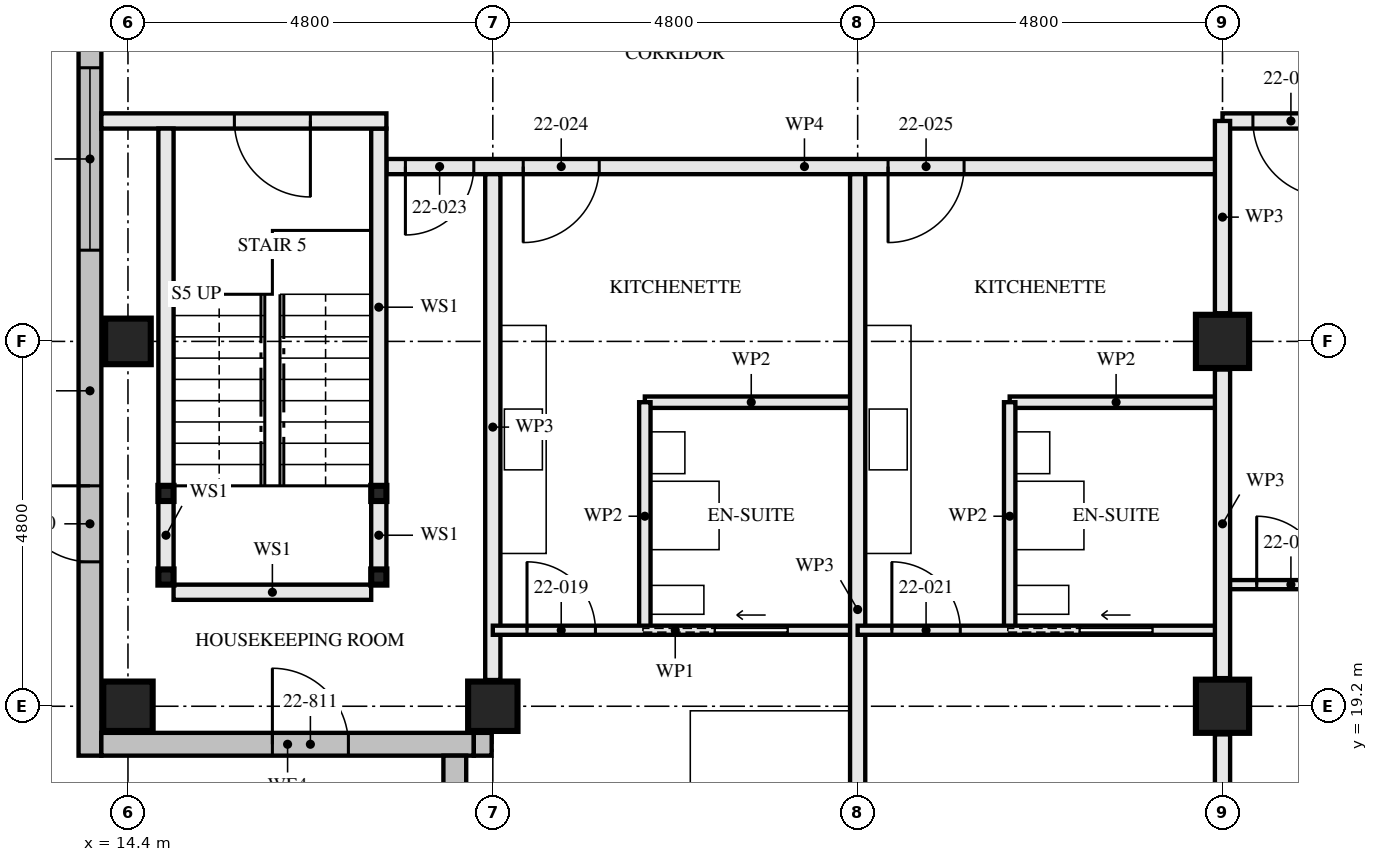
"""IFC4 building model, lengths in metres.
Left out: names, types, materials, properties, quantities, classifications, styles, units other than length and angle.
Written with IfcOpenShell. Run it as: python <this file> out.ifc"""

import sys

from ifc_helpers import new_model, si_unit, direction, frame, frame_2d, origin, origin_2d, place, context, subcontext, project, spatial, rectangle, hollow_rectangle, extrude, element, fill, save


model = new_model("IFC4")
c1 = context("Model", 3, precision=1e-05, world=origin(), true_north=direction((0.0, 1.0)))
c2 = subcontext(c1, "Body", "Model", "MODEL_VIEW")
j1 = project(units=[si_unit("LENGTHUNIT", "METRE"), si_unit("PLANEANGLEUNIT", "RADIAN")], contexts=[c1])
p1 = place(None, origin())
s1 = spatial("IfcSite", under=j1, at=p1, CompositionType="ELEMENT")
p2 = place(p1, origin())
s2 = spatial("IfcBuilding", under=s1, at=p2, CompositionType="ELEMENT")
p3 = place(p2, frame((0.0, 0.0, 84.0)))
s3 = spatial("IfcBuildingStorey", under=s2, at=p3, CompositionType="ELEMENT", Elevation=84.0)
p4 = place(p3, frame((14.4, 19.2, 0.0), z_axis=(0.0, 0.0, 1.0), x_axis=(0.0, 1.0, 0.0)))
e1 = element("IfcColumn", 1, at=p4, inside=s3, PredefinedType="COLUMN", context=c2, shape_type="SweptSolid", body=[
    extrude(hollow_rectangle(XDim=0.65, YDim=0.65, WallThickness=0.08, at=origin_2d()), origin(), (0.0, 0.0, 1.0), 3.5),
])
p5 = place(p3, frame((14.4, 24.0, 0.0), z_axis=(0.0, 0.0, 1.0), x_axis=(1.0, 0.0, 0.0)))
e2 = element("IfcColumn", 2, at=p5, inside=s3, PredefinedType="COLUMN", context=c2, shape_type="SweptSolid", body=[
    extrude(hollow_rectangle(XDim=0.6, YDim=0.6, WallThickness=0.08, at=origin_2d()), origin(), (0.0, 0.0, 1.0), 3.5),
])
p6 = place(p3, frame((19.2, 19.2, 0.0), z_axis=(0.0, 0.0, 1.0), x_axis=(0.0, 1.0, 0.0)))
e3 = element("IfcColumn", 3, at=p6, inside=s3, PredefinedType="COLUMN", context=c2, shape_type="SweptSolid", body=[
    extrude(hollow_rectangle(XDim=0.65, YDim=0.65, WallThickness=0.08, at=origin_2d()), origin(), (0.0, 0.0, 1.0), 3.5),
])
for number, where, z_axis, x_axis in (
    (4, (28.8, 19.2, 0.0), (0.0, 0.0, 1.0), (1.0, 0.0, 0.0)),
    (5, (28.8, 24.0, 0.0), (0.0, 0.0, 1.0), (1.0, 0.0, 0.0)),
):
    element("IfcColumn", number, at=place(p3, frame(where, z_axis=z_axis, x_axis=x_axis)), inside=s3, PredefinedType="COLUMN", context=c2, shape_type="SweptSolid", body=[
        extrude(hollow_rectangle(XDim=0.7, YDim=0.7, WallThickness=0.06, at=origin_2d()), origin(), (0.0, 0.0, 1.0), 3.5),
    ])
for number, where, z_axis, x_axis in (
    (6, (14.9, 20.9, 0.0), (0.0, 0.0, 1.0), (1.0, 0.0, 0.0)),
    (7, (17.7, 20.9, 0.0), (0.0, 0.0, 1.0), (1.0, 0.0, 0.0)),
    (8, (14.9, 22.0, 0.0), (0.0, 0.0, 1.0), (1.0, 0.0, 0.0)),
    (9, (17.7, 22.0, 0.0), (0.0, 0.0, 1.0), (1.0, 0.0, 0.0)),
):
    element("IfcColumn", number, at=place(p3, frame(where, z_axis=z_axis, x_axis=x_axis)), inside=s3, PredefinedType="COLUMN", context=c2, shape_type="SweptSolid", body=[
        extrude(hollow_rectangle(XDim=0.2, YDim=0.2, WallThickness=0.008, at=origin_2d()), origin(), (0.0, 0.0, 1.0), 3.33),
    ])
p7 = place(p3, frame((13.9, 28.15, 0.0), z_axis=(0.0, 0.0, 1.0), x_axis=(0.0, -1.0, 0.0)))
e10 = element("IfcWall", 10, at=p7, inside=s3, PredefinedType="SOLIDWALL", context=c2, shape_type="SweptSolid", body=[
    extrude(rectangle(XDim=9.6, YDim=0.3, at=frame_2d((4.8, 0.0))), origin(), (0.0, 0.0, 1.0), 3.5),
])
p8 = place(p7, frame((6.05, 0.0, 0.0)))
e11 = element("IfcOpeningElement", 11, at=p8, cuts=e10, PredefinedType="OPENING", context=c2, shape_type="SweptSolid", body=[
    extrude(rectangle(XDim=1.0, YDim=2.4, at=frame_2d((0.5, 1.2))), frame((0.0, 0.161, 0.0), z_axis=(0.0, -1.0, 0.0), x_axis=(1.0, 0.0, 0.0)), (0.0, 0.0, 1.0), 0.321),
])
p9 = place(p7, frame((0.55, 0.0, 0.6)))
e12 = element("IfcOpeningElement", 12, at=p9, cuts=e10, PredefinedType="OPENING", context=c2, shape_type="SweptSolid", body=[
    extrude(rectangle(XDim=2.4, YDim=1.8, at=frame_2d((1.2, 0.9))), frame((0.0, 0.161, 0.0), z_axis=(0.0, -1.0, 0.0), x_axis=(1.0, 0.0, 0.0)), (0.0, 0.0, 1.0), 0.321),
])
p10 = place(p3, frame((14.05, 18.7, 0.0), z_axis=(0.0, 0.0, 1.0), x_axis=(1.0, 0.0, 0.0)))
e13 = element("IfcWall", 13, at=p10, inside=s3, PredefinedType="SOLIDWALL", context=c2, shape_type="SweptSolid", body=[
    extrude(rectangle(XDim=4.9, YDim=0.3, at=frame_2d((2.45, 0.0))), origin(), (0.0, 0.0, 1.0), 3.5),
])
p11 = place(p10, frame((2.25, 0.0, 0.0)))
e14 = element("IfcOpeningElement", 14, at=p11, cuts=e13, PredefinedType="OPENING", context=c2, shape_type="SweptSolid", body=[
    extrude(rectangle(XDim=1.0, YDim=2.4, at=frame_2d((0.5, 1.2))), frame((0.0, 0.161, 0.0), z_axis=(0.0, -1.0, 0.0), x_axis=(1.0, 0.0, 0.0)), (0.0, 0.0, 1.0), 0.321),
])
p12 = place(p3, frame((18.7, 18.55, 0.0), z_axis=(0.0, 0.0, 1.0), x_axis=(0.0, -1.0, 0.0)))
e15 = element("IfcWall", 15, at=p12, inside=s3, PredefinedType="SOLIDWALL", context=c2, shape_type="SweptSolid", body=[
    extrude(rectangle(XDim=4.5, YDim=0.3, at=frame_2d((2.25, 0.0))), origin(), (0.0, 0.0, 1.0), 3.5),
])
p13 = place(p12, frame((1.25, 0.0, 0.0)))
e16 = element("IfcOpeningElement", 16, at=p13, cuts=e15, PredefinedType="OPENING", context=c2, shape_type="SweptSolid", body=[
    extrude(rectangle(XDim=1.0, YDim=2.4, at=frame_2d((0.5, 1.2))), frame((0.0, 0.161, 0.0), z_axis=(0.0, -1.0, 0.0), x_axis=(1.0, 0.0, 0.0)), (0.0, 0.0, 1.0), 0.321),
])
p14 = place(p3, frame((18.95, 18.7, 2.39), z_axis=(0.0, 0.0, 1.0), x_axis=(1.0, 0.0, 0.0)))
e17 = element("IfcWall", 17, at=p14, inside=s3, PredefinedType="SOLIDWALL", context=c2, shape_type="SweptSolid", body=[
    extrude(rectangle(XDim=0.235, YDim=0.3, at=frame_2d((0.118, 0.0))), origin(), (0.0, 0.0, 1.0), 0.88),
])
p15 = place(p3, frame((14.9, 21.0, 0.0), z_axis=(0.0, 0.0, 1.0), x_axis=(0.0, 1.0, 0.0)))
e18 = element("IfcWall", 18, at=p15, inside=s3, PredefinedType="SOLIDWALL", context=c2, shape_type="SweptSolid", body=[
    extrude(rectangle(XDim=0.9, YDim=0.2, at=frame_2d((0.45, 0.0))), origin(), (0.0, 0.0, 1.0), 2.99),
])
p16 = place(p3, frame((14.9, 22.1, 0.0), z_axis=(0.0, 0.0, 1.0), x_axis=(0.0, 1.0, 0.0)))
e19 = element("IfcWall", 19, at=p16, inside=s3, PredefinedType="SOLIDWALL", context=c2, shape_type="SweptSolid", body=[
    extrude(rectangle(XDim=4.7, YDim=0.2, at=frame_2d((2.35, 0.0))), origin(), (0.0, 0.0, 1.0), 2.99),
])
p17 = place(p3, frame((17.7, 21.0, 0.0), z_axis=(0.0, 0.0, 1.0), x_axis=(0.0, 1.0, 0.0)))
e20 = element("IfcWall", 20, at=p17, inside=s3, PredefinedType="SOLIDWALL", context=c2, shape_type="SweptSolid", body=[
    extrude(rectangle(XDim=0.9, YDim=0.2, at=frame_2d((0.45, 0.0))), origin(), (0.0, 0.0, 1.0), 2.99),
])
p18 = place(p3, frame((17.7, 22.1, 0.0), z_axis=(0.0, 0.0, 1.0), x_axis=(0.0, 1.0, 0.0)))
e21 = element("IfcWall", 21, at=p18, inside=s3, PredefinedType="SOLIDWALL", context=c2, shape_type="SweptSolid", body=[
    extrude(rectangle(XDim=4.7, YDim=0.2, at=frame_2d((2.35, 0.0))), origin(), (0.0, 0.0, 1.0), 2.99),
])
p19 = place(p3, frame((15.0, 20.7, 0.0), z_axis=(0.0, 0.0, 1.0), x_axis=(1.0, 0.0, 0.0)))
e22 = element("IfcWall", 22, at=p19, inside=s3, PredefinedType="SOLIDWALL", context=c2, shape_type="SweptSolid", body=[
    extrude(rectangle(XDim=2.6, YDim=0.2, at=frame_2d((1.3, 0.0))), origin(), (0.0, 0.0, 1.0), 3.33),
])
p20 = place(p3, frame((14.05, 26.9, 0.0), z_axis=(0.0, 0.0, 1.0), x_axis=(1.0, 0.0, 0.0)))
e23 = element("IfcWall", 23, at=p20, inside=s3, PredefinedType="SOLIDWALL", context=c2, shape_type="SweptSolid", body=[
    extrude(rectangle(XDim=3.75, YDim=0.2, at=frame_2d((1.875, 0.0))), origin(), (0.0, 0.0, 1.0), 2.32),
])
p21 = place(p20, frame((1.75, 0.0, 0.0)))
e24 = element("IfcOpeningElement", 24, at=p21, cuts=e23, PredefinedType="OPENING", context=c2, shape_type="SweptSolid", body=[
    extrude(rectangle(XDim=1.0, YDim=2.1, at=frame_2d((0.5, 1.05))), frame((0.0, 0.111, 0.0), z_axis=(0.0, -1.0, 0.0), x_axis=(1.0, 0.0, 0.0)), (0.0, 0.0, 1.0), 0.221),
])
p22 = place(p3, frame((19.2, 19.545, 0.0), z_axis=(0.0, 0.0, 1.0), x_axis=(0.0, 1.0, 0.0)))
e25 = element("IfcWall", 25, at=p22, inside=s3, PredefinedType="PARTITIONING", context=c2, shape_type="SweptSolid", body=[
    extrude(rectangle(XDim=6.655, YDim=0.2, at=frame_2d((3.328, 0.0))), origin(), (0.0, 0.0, 1.0), 2.55),
])
p23 = place(p3, frame((21.2, 20.2, 0.0), z_axis=(0.0, 0.0, 1.0), x_axis=(0.0, 1.0, 0.0)))
e26 = element("IfcWall", 26, at=p23, inside=s3, PredefinedType="PARTITIONING", context=c2, shape_type="SweptSolid", body=[
    extrude(rectangle(XDim=3.0, YDim=0.15, at=frame_2d((1.5, 0.0))), origin(), (0.0, 0.0, 1.0), 3.33),
])
p24 = place(p3, frame((21.2, 23.2, 0.0), z_axis=(0.0, 0.0, 1.0), x_axis=(1.0, 0.0, 0.0)))
e27 = element("IfcWall", 27, at=p24, inside=s3, PredefinedType="PARTITIONING", context=c2, shape_type="SweptSolid", body=[
    extrude(rectangle(XDim=2.8, YDim=0.15, at=frame_2d((1.4, 0.0))), origin(), (0.0, 0.0, 1.0), 3.33),
])
p25 = place(p3, frame((19.2, 20.2, 0.0), z_axis=(0.0, 0.0, 1.0), x_axis=(1.0, 0.0, 0.0)))
e28 = element("IfcWall", 28, at=p25, inside=s3, PredefinedType="PARTITIONING", context=c2, shape_type="SweptSolid", body=[
    extrude(rectangle(XDim=4.8, YDim=0.12, at=frame_2d((2.4, 0.0))), origin(), (0.0, 0.0, 1.0), 3.33),
])
p26 = place(p25, frame((0.45, 0.0, 0.0)))
e29 = element("IfcOpeningElement", 29, at=p26, cuts=e28, PredefinedType="OPENING", context=c2, shape_type="SweptSolid", body=[
    extrude(rectangle(XDim=0.9, YDim=2.1, at=frame_2d((0.45, 1.05))), frame((0.0, 0.071, 0.0), z_axis=(0.0, -1.0, 0.0), x_axis=(1.0, 0.0, 0.0)), (0.0, 0.0, 1.0), 0.141),
])
p27 = place(p25, frame((2.925, 0.0, 0.0)))
e30 = element("IfcOpeningElement", 30, at=p27, cuts=e28, PredefinedType="OPENING", context=c2, shape_type="SweptSolid", body=[
    extrude(rectangle(XDim=0.95, YDim=2.1, at=frame_2d((0.475, 1.05))), frame((0.0, 0.071, 0.0), z_axis=(0.0, -1.0, 0.0), x_axis=(1.0, 0.0, 0.0)), (0.0, 0.0, 1.0), 0.141),
])
p28 = place(p3, frame((24.0, 14.745, 0.0), z_axis=(0.0, 0.0, 1.0), x_axis=(0.0, 1.0, 0.0)))
e31 = element("IfcWall", 31, at=p28, inside=s3, PredefinedType="PARTITIONING", context=c2, shape_type="SweptSolid", body=[
    extrude(rectangle(XDim=11.455, YDim=0.2, at=frame_2d((5.728, 0.0))), origin(), (0.0, 0.0, 1.0), 2.55),
])
p29 = place(p3, frame((26.0, 20.2, 0.0), z_axis=(0.0, 0.0, 1.0), x_axis=(0.0, 1.0, 0.0)))
e32 = element("IfcWall", 32, at=p29, inside=s3, PredefinedType="PARTITIONING", context=c2, shape_type="SweptSolid", body=[
    extrude(rectangle(XDim=3.0, YDim=0.15, at=frame_2d((1.5, 0.0))), origin(), (0.0, 0.0, 1.0), 3.33),
])
p30 = place(p3, frame((26.0, 23.2, 0.0), z_axis=(0.0, 0.0, 1.0), x_axis=(1.0, 0.0, 0.0)))
e33 = element("IfcWall", 33, at=p30, inside=s3, PredefinedType="PARTITIONING", context=c2, shape_type="SweptSolid", body=[
    extrude(rectangle(XDim=2.8, YDim=0.15, at=frame_2d((1.4, 0.0))), origin(), (0.0, 0.0, 1.0), 3.33),
])
p31 = place(p3, frame((24.0, 20.2, 0.0), z_axis=(0.0, 0.0, 1.0), x_axis=(1.0, 0.0, 0.0)))
e34 = element("IfcWall", 34, at=p31, inside=s3, PredefinedType="PARTITIONING", context=c2, shape_type="SweptSolid", body=[
    extrude(rectangle(XDim=4.8, YDim=0.12, at=frame_2d((2.4, 0.0))), origin(), (0.0, 0.0, 1.0), 3.33),
])
p32 = place(p31, frame((0.45, 0.0, 0.0)))
e35 = element("IfcOpeningElement", 35, at=p32, cuts=e34, PredefinedType="OPENING", context=c2, shape_type="SweptSolid", body=[
    extrude(rectangle(XDim=0.9, YDim=2.1, at=frame_2d((0.45, 1.05))), frame((0.0, 0.071, 0.0), z_axis=(0.0, -1.0, 0.0), x_axis=(1.0, 0.0, 0.0)), (0.0, 0.0, 1.0), 0.141),
])
p33 = place(p31, frame((2.925, 0.0, 0.0)))
e36 = element("IfcOpeningElement", 36, at=p33, cuts=e34, PredefinedType="OPENING", context=c2, shape_type="SweptSolid", body=[
    extrude(rectangle(XDim=0.95, YDim=2.1, at=frame_2d((0.475, 1.05))), frame((0.0, 0.071, 0.0), z_axis=(0.0, -1.0, 0.0), x_axis=(1.0, 0.0, 0.0)), (0.0, 0.0, 1.0), 0.141),
])
p34 = place(p3, frame((17.8, 26.3, 0.0), z_axis=(0.0, 0.0, 1.0), x_axis=(1.0, 0.0, 0.0)))
e37 = element("IfcWall", 37, at=p34, inside=s3, PredefinedType="PARTITIONING", context=c2, shape_type="SweptSolid", body=[
    extrude(rectangle(XDim=11.0, YDim=0.2, at=frame_2d((5.5, 0.0))), origin(), (0.0, 0.0, 1.0), 2.55),
])
p35 = place(p34, frame((0.25, 0.0, 0.0)))
e38 = element("IfcOpeningElement", 38, at=p35, cuts=e37, PredefinedType="OPENING", context=c2, shape_type="SweptSolid", body=[
    extrude(rectangle(XDim=0.9, YDim=2.1, at=frame_2d((0.45, 1.05))), frame((0.0, 0.111, 0.0), z_axis=(0.0, -1.0, 0.0), x_axis=(1.0, 0.0, 0.0)), (0.0, 0.0, 1.0), 0.221),
])
p36 = place(p34, frame((1.8, 0.0, 0.0)))
e39 = element("IfcOpeningElement", 39, at=p36, cuts=e37, PredefinedType="OPENING", context=c2, shape_type="SweptSolid", body=[
    extrude(rectangle(XDim=1.0, YDim=2.1, at=frame_2d((0.5, 1.05))), frame((0.0, 0.111, 0.0), z_axis=(0.0, -1.0, 0.0), x_axis=(1.0, 0.0, 0.0)), (0.0, 0.0, 1.0), 0.221),
])
p37 = place(p34, frame((6.6, 0.0, 0.0)))
e40 = element("IfcOpeningElement", 40, at=p37, cuts=e37, PredefinedType="OPENING", context=c2, shape_type="SweptSolid", body=[
    extrude(rectangle(XDim=1.0, YDim=2.1, at=frame_2d((0.5, 1.05))), frame((0.0, 0.111, 0.0), z_axis=(0.0, -1.0, 0.0), x_axis=(1.0, 0.0, 0.0)), (0.0, 0.0, 1.0), 0.221),
])
p38 = place(p3, frame((28.8, 20.8, 0.0), z_axis=(0.0, 0.0, 1.0), x_axis=(1.0, 0.0, 0.0)))
e41 = element("IfcWall", 41, at=p38, inside=s3, PredefinedType="PARTITIONING", context=c2, shape_type="SweptSolid", body=[
    extrude(rectangle(XDim=4.8, YDim=0.12, at=frame_2d((2.4, 0.0))), origin(), (0.0, 0.0, 1.0), 3.33),
])
p39 = place(p38, frame((0.45, 0.0, 0.0)))
e42 = element("IfcOpeningElement", 42, at=p39, cuts=e41, PredefinedType="OPENING", context=c2, shape_type="SweptSolid", body=[
    extrude(rectangle(XDim=0.9, YDim=2.1, at=frame_2d((0.45, 1.05))), frame((0.0, 0.071, 0.0), z_axis=(0.0, -1.0, 0.0), x_axis=(1.0, 0.0, 0.0)), (0.0, 0.0, 1.0), 0.141),
])
p40 = place(p38, frame((2.925, 0.0, 0.0)))
e43 = element("IfcOpeningElement", 43, at=p40, cuts=e41, PredefinedType="OPENING", context=c2, shape_type="SweptSolid", body=[
    extrude(rectangle(XDim=0.95, YDim=2.1, at=frame_2d((0.475, 1.05))), frame((0.0, 0.071, 0.0), z_axis=(0.0, -1.0, 0.0), x_axis=(1.0, 0.0, 0.0)), (0.0, 0.0, 1.0), 0.141),
])
p41 = place(p3, frame((28.8, 26.9, 0.0), z_axis=(0.0, 0.0, 1.0), x_axis=(1.0, 0.0, 0.0)))
e44 = element("IfcWall", 44, at=p41, inside=s3, PredefinedType="PARTITIONING", context=c2, shape_type="SweptSolid", body=[
    extrude(rectangle(XDim=9.6, YDim=0.2, at=frame_2d((4.8, 0.0))), origin(), (0.0, 0.0, 1.0), 3.33),
])
p42 = place(p41, frame((0.4, 0.0, 0.0)))
e45 = element("IfcOpeningElement", 45, at=p42, cuts=e44, PredefinedType="OPENING", context=c2, shape_type="SweptSolid", body=[
    extrude(rectangle(XDim=1.0, YDim=2.1, at=frame_2d((0.5, 1.05))), frame((0.0, 0.111, 0.0), z_axis=(0.0, -1.0, 0.0), x_axis=(1.0, 0.0, 0.0)), (0.0, 0.0, 1.0), 0.221),
])
p43 = place(p41, frame((5.2, 0.0, 0.0)))
e46 = element("IfcOpeningElement", 46, at=p43, cuts=e44, PredefinedType="OPENING", context=c2, shape_type="SweptSolid", body=[
    extrude(rectangle(XDim=1.0, YDim=2.1, at=frame_2d((0.5, 1.05))), frame((0.0, 0.111, 0.0), z_axis=(0.0, -1.0, 0.0), x_axis=(1.0, 0.0, 0.0)), (0.0, 0.0, 1.0), 0.221),
])
p44 = place(p3, frame((28.8, 14.647, 0.0), z_axis=(0.0, 0.0, 1.0), x_axis=(0.0, 1.0, 0.0)))
e47 = element("IfcWall", 47, at=p44, inside=s3, PredefinedType="PARTITIONING", context=c2, shape_type="SweptSolid", body=[
    extrude(rectangle(XDim=4.183, YDim=0.2, at=frame_2d((2.092, 0.0))), origin(), (0.0, 0.0, 1.0), 2.32),
])
p45 = place(p3, frame((28.8, 19.57, 0.0), z_axis=(0.0, 0.0, 1.0), x_axis=(0.0, 1.0, 0.0)))
e48 = element("IfcWall", 48, at=p45, inside=s3, PredefinedType="PARTITIONING", context=c2, shape_type="SweptSolid", body=[
    extrude(rectangle(XDim=4.06, YDim=0.2, at=frame_2d((2.03, 0.0))), origin(), (0.0, 0.0, 1.0), 2.32),
])
p46 = place(p3, frame((28.8, 24.37, 0.0), z_axis=(0.0, 0.0, 1.0), x_axis=(0.0, 1.0, 0.0)))
e49 = element("IfcWall", 49, at=p46, inside=s3, PredefinedType="PARTITIONING", context=c2, shape_type="SweptSolid", body=[
    extrude(rectangle(XDim=2.53, YDim=0.2, at=frame_2d((1.265, 0.0))), origin(), (0.0, 0.0, 1.0), 2.32),
])
p47 = place(p8, frame((1.0, 0.0, 0.0), z_axis=(0.0, 0.0, 1.0), x_axis=(-1.0, 0.0, 0.0)))
e50 = element("IfcDoor", 50, at=p47, inside=s3, OperationType="SINGLE_SWING_LEFT", PredefinedType="DOOR", context=c2, shape_type="SweptSolid", body=[
    extrude(rectangle(XDim=1.0, YDim=2.4, at=frame_2d((0.5, 1.2))), frame((0.0, 0.035, 0.0), z_axis=(0.0, -1.0, 0.0), x_axis=(1.0, 0.0, 0.0)), (0.0, 0.0, 1.0), 0.07),
])
fill(e11, e50)
p48 = place(p9, origin())
e51 = element("IfcWindow", 51, at=p48, inside=s3, PartitioningType="SINGLE_PANEL", PredefinedType="WINDOW", context=c2, shape_type="SweptSolid", body=[
    extrude(rectangle(XDim=2.4, YDim=1.8, at=frame_2d((1.2, 0.9))), frame((0.0, 0.03, 0.0), z_axis=(0.0, -1.0, 0.0), x_axis=(1.0, 0.0, 0.0)), (0.0, 0.0, 1.0), 0.06),
])
fill(e12, e51)
p49 = place(p11, origin())
e52 = element("IfcDoor", 52, at=p49, inside=s3, OperationType="SINGLE_SWING_LEFT", PredefinedType="DOOR", context=c2, shape_type="SweptSolid", body=[
    extrude(rectangle(XDim=1.0, YDim=2.4, at=frame_2d((0.5, 1.2))), frame((0.0, 0.035, 0.0), z_axis=(0.0, -1.0, 0.0), x_axis=(1.0, 0.0, 0.0)), (0.0, 0.0, 1.0), 0.07),
])
fill(e14, e52)
p50 = place(p21, frame((1.0, 0.0, 0.0), z_axis=(0.0, 0.0, 1.0), x_axis=(-1.0, 0.0, 0.0)))
e53 = element("IfcDoor", 53, at=p50, inside=s3, OperationType="SINGLE_SWING_RIGHT", PredefinedType="DOOR", context=c2, shape_type="SweptSolid", body=[
    extrude(rectangle(XDim=1.0, YDim=2.1, at=frame_2d((0.5, 1.05))), frame((0.0, 0.032, 0.0), z_axis=(0.0, -1.0, 0.0), x_axis=(1.0, 0.0, 0.0)), (0.0, 0.0, 1.0), 0.064),
])
fill(e24, e53)
p51 = place(p26, origin())
e54 = element("IfcDoor", 54, at=p51, inside=s3, OperationType="SINGLE_SWING_RIGHT", PredefinedType="DOOR", context=c2, shape_type="SweptSolid", body=[
    extrude(rectangle(XDim=0.9, YDim=2.1, at=frame_2d((0.45, 1.05))), frame((0.0, 0.022, 0.0), z_axis=(0.0, -1.0, 0.0), x_axis=(1.0, 0.0, 0.0)), (0.0, 0.0, 1.0), 0.044),
])
fill(e29, e54)
p52 = place(p27, origin())
e55 = element("IfcDoor", 55, at=p52, inside=s3, OperationType="SLIDING_TO_RIGHT", PredefinedType="DOOR", context=c2, shape_type="SweptSolid", body=[
    extrude(rectangle(XDim=0.95, YDim=2.1, at=frame_2d((0.475, 1.05))), frame((0.0, 0.022, 0.0), z_axis=(0.0, -1.0, 0.0), x_axis=(1.0, 0.0, 0.0)), (0.0, 0.0, 1.0), 0.044),
])
fill(e30, e55)
p53 = place(p32, origin())
e56 = element("IfcDoor", 56, at=p53, inside=s3, OperationType="SINGLE_SWING_RIGHT", PredefinedType="DOOR", context=c2, shape_type="SweptSolid", body=[
    extrude(rectangle(XDim=0.9, YDim=2.1, at=frame_2d((0.45, 1.05))), frame((0.0, 0.022, 0.0), z_axis=(0.0, -1.0, 0.0), x_axis=(1.0, 0.0, 0.0)), (0.0, 0.0, 1.0), 0.044),
])
fill(e35, e56)
p54 = place(p33, origin())
e57 = element("IfcDoor", 57, at=p54, inside=s3, OperationType="SLIDING_TO_RIGHT", PredefinedType="DOOR", context=c2, shape_type="SweptSolid", body=[
    extrude(rectangle(XDim=0.95, YDim=2.1, at=frame_2d((0.475, 1.05))), frame((0.0, 0.022, 0.0), z_axis=(0.0, -1.0, 0.0), x_axis=(1.0, 0.0, 0.0)), (0.0, 0.0, 1.0), 0.044),
])
fill(e36, e57)
p55 = place(p35, frame((0.9, 0.0, 0.0), z_axis=(0.0, 0.0, 1.0), x_axis=(-1.0, 0.0, 0.0)))
e58 = element("IfcDoor", 58, at=p55, inside=s3, OperationType="SINGLE_SWING_LEFT", PredefinedType="DOOR", context=c2, shape_type="SweptSolid", body=[
    extrude(rectangle(XDim=0.9, YDim=2.1, at=frame_2d((0.45, 1.05))), frame((0.0, 0.027, 0.0), z_axis=(0.0, -1.0, 0.0), x_axis=(1.0, 0.0, 0.0)), (0.0, 0.0, 1.0), 0.054),
])
fill(e38, e58)
p56 = place(p36, frame((1.0, 0.0, 0.0), z_axis=(0.0, 0.0, 1.0), x_axis=(-1.0, 0.0, 0.0)))
e59 = element("IfcDoor", 59, at=p56, inside=s3, OperationType="SINGLE_SWING_LEFT", PredefinedType="DOOR", context=c2, shape_type="SweptSolid", body=[
    extrude(rectangle(XDim=1.0, YDim=2.1, at=frame_2d((0.5, 1.05))), frame((0.0, 0.027, 0.0), z_axis=(0.0, -1.0, 0.0), x_axis=(1.0, 0.0, 0.0)), (0.0, 0.0, 1.0), 0.054),
])
fill(e39, e59)
p57 = place(p37, frame((1.0, 0.0, 0.0), z_axis=(0.0, 0.0, 1.0), x_axis=(-1.0, 0.0, 0.0)))
e60 = element("IfcDoor", 60, at=p57, inside=s3, OperationType="SINGLE_SWING_LEFT", PredefinedType="DOOR", context=c2, shape_type="SweptSolid", body=[
    extrude(rectangle(XDim=1.0, YDim=2.1, at=frame_2d((0.5, 1.05))), frame((0.0, 0.027, 0.0), z_axis=(0.0, -1.0, 0.0), x_axis=(1.0, 0.0, 0.0)), (0.0, 0.0, 1.0), 0.054),
])
fill(e40, e60)
p58 = place(p39, origin())
e61 = element("IfcDoor", 61, at=p58, inside=s3, OperationType="SINGLE_SWING_RIGHT", PredefinedType="DOOR", context=c2, shape_type="SweptSolid", body=[
    extrude(rectangle(XDim=0.9, YDim=2.1, at=frame_2d((0.45, 1.05))), frame((0.0, 0.022, 0.0), z_axis=(0.0, -1.0, 0.0), x_axis=(1.0, 0.0, 0.0)), (0.0, 0.0, 1.0), 0.044),
])
fill(e42, e61)
p59 = place(p42, frame((1.0, 0.0, 0.0), z_axis=(0.0, 0.0, 1.0), x_axis=(-1.0, 0.0, 0.0)))
e62 = element("IfcDoor", 62, at=p59, inside=s3, OperationType="SINGLE_SWING_RIGHT", PredefinedType="DOOR", context=c2, shape_type="SweptSolid", body=[
    extrude(rectangle(XDim=1.0, YDim=2.1, at=frame_2d((0.5, 1.05))), frame((0.0, 0.027, 0.0), z_axis=(0.0, -1.0, 0.0), x_axis=(1.0, 0.0, 0.0)), (0.0, 0.0, 1.0), 0.054),
])
fill(e45, e62)
save(model, sys.argv[1])
